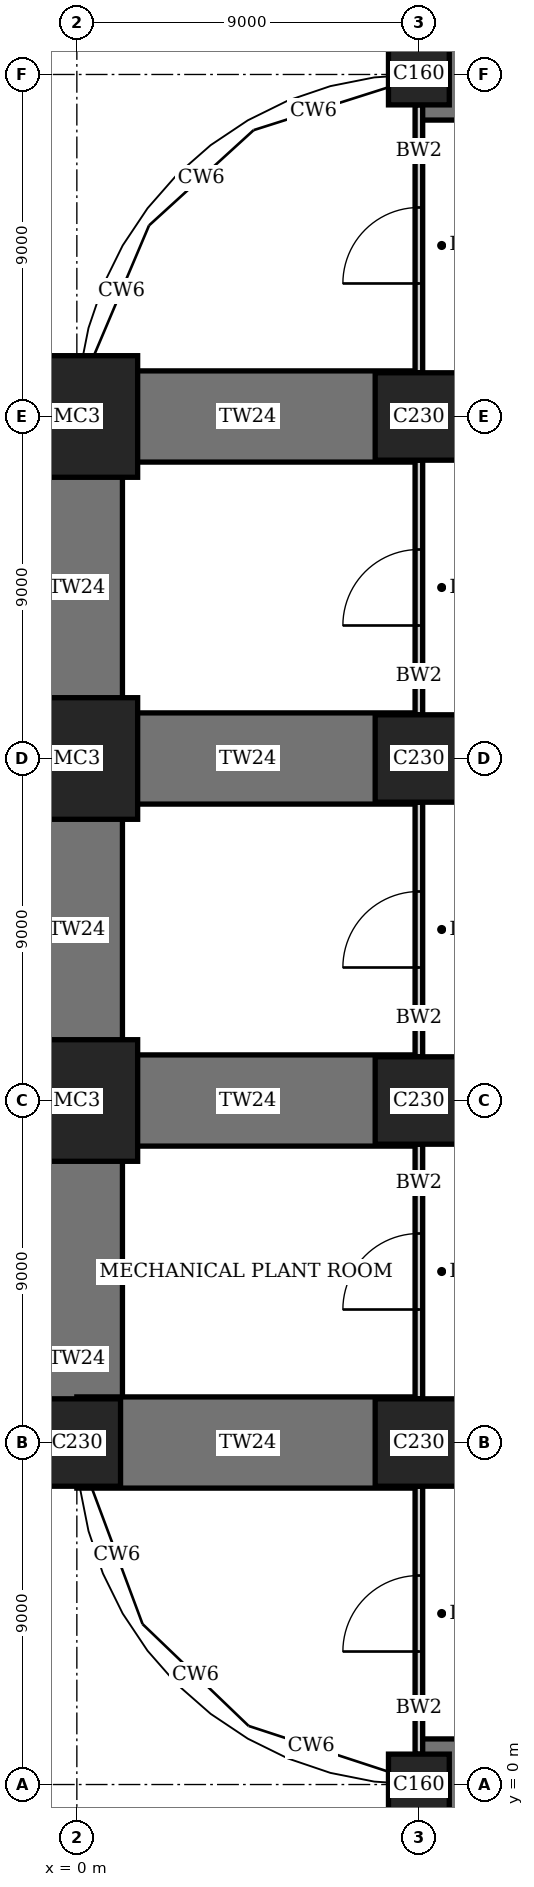
"""IFC4 building model, lengths in metres.
Left out: names, types, materials, properties, quantities, classifications, styles, units other than length and angle.
Written with IfcOpenShell. Run it as: python <this file> out.ifc"""

import sys

from ifc_helpers import new_model, si_unit, direction, frame, frame_2d, origin, origin_2d, place, context, subcontext, project, spatial, rectangle, extrude, element, fill, save


model = new_model("IFC4")
c1 = context("Model", 3, precision=1e-05, world=origin(), true_north=direction((0.0, 1.0)))
c2 = subcontext(c1, "Body", "Model", "MODEL_VIEW")
j1 = project(units=[si_unit("LENGTHUNIT", "METRE"), si_unit("PLANEANGLEUNIT", "RADIAN")], contexts=[c1])
p1 = place(None, origin())
s1 = spatial("IfcSite", under=j1, at=p1, CompositionType="ELEMENT")
p2 = place(p1, origin())
s2 = spatial("IfcBuilding", under=s1, at=p2, CompositionType="ELEMENT")
p3 = place(p2, frame((0.0, 0.0, 234.4)))
s3 = spatial("IfcBuildingStorey", under=s2, at=p3, CompositionType="ELEMENT", Elevation=234.4)
p4 = place(p3, frame((0.0, 9.0, 0.0), z_axis=(0.0, 0.0, 1.0), x_axis=(1.0, 0.0, 0.0)))
e1 = element("IfcColumn", 1, at=p4, inside=s3, PredefinedType="COLUMN", context=c2, shape_type="SweptSolid", body=[
    extrude(rectangle(XDim=2.3, YDim=2.3, at=origin_2d()), origin(), (0.0, 0.0, 1.0), 5.0),
])
for number, where, z_axis, x_axis in (
    (2, (0.0, 18.0, 0.0), (0.0, 0.0, 1.0), (1.0, 0.0, 0.0)),
    (3, (0.0, 27.0, 0.0), (0.0, 0.0, 1.0), (1.0, 0.0, 0.0)),
    (4, (0.0, 36.0, 0.0), (0.0, 0.0, 1.0), (1.0, 0.0, 0.0)),
):
    element("IfcColumn", number, at=place(p3, frame(where, z_axis=z_axis, x_axis=x_axis)), inside=s3, PredefinedType="COLUMN", context=c2, shape_type="SweptSolid", body=[
        extrude(rectangle(XDim=3.2, YDim=3.2, at=origin_2d()), origin(), (0.0, 0.0, 1.0), 5.0),
    ])
p5 = place(p3, frame((9.0, 0.0, 0.0), z_axis=(0.0, 0.0, 1.0), x_axis=(1.0, 0.0, 0.0)))
e5 = element("IfcColumn", 5, at=p5, inside=s3, PredefinedType="COLUMN", context=c2, shape_type="SweptSolid", body=[
    extrude(rectangle(XDim=1.6, YDim=1.6, at=origin_2d()), origin(), (0.0, 0.0, 1.0), 5.0),
])
for number, where, z_axis, x_axis in (
    (6, (9.0, 9.0, 0.0), (0.0, 0.0, 1.0), (1.0, 0.0, 0.0)),
    (7, (9.0, 18.0, 0.0), (0.0, 0.0, 1.0), (1.0, 0.0, 0.0)),
    (8, (9.0, 27.0, 0.0), (0.0, 0.0, 1.0), (1.0, 0.0, 0.0)),
    (9, (9.0, 36.0, 0.0), (0.0, 0.0, 1.0), (1.0, 0.0, 0.0)),
):
    element("IfcColumn", number, at=place(p3, frame(where, z_axis=z_axis, x_axis=x_axis)), inside=s3, PredefinedType="COLUMN", context=c2, shape_type="SweptSolid", body=[
        extrude(rectangle(XDim=2.3, YDim=2.3, at=origin_2d()), origin(), (0.0, 0.0, 1.0), 5.0),
    ])
p6 = place(p3, frame((9.0, 45.0, 0.0), z_axis=(0.0, 0.0, 1.0), x_axis=(1.0, 0.0, 0.0)))
e10 = element("IfcColumn", 10, at=p6, inside=s3, PredefinedType="COLUMN", context=c2, shape_type="SweptSolid", body=[
    extrude(rectangle(XDim=1.6, YDim=1.6, at=origin_2d()), origin(), (0.0, 0.0, 1.0), 5.0),
])
for number, where, z_axis, x_axis in (
    (11, (9.0, 0.0, 0.0), (0.0, 0.0, 1.0), (1.0, 0.0, 0.0)),
    (12, (9.0, 45.0, 0.0), (0.0, 0.0, 1.0), (1.0, 0.0, 0.0)),
    (13, (0.0, 9.0, 0.0), (0.0, 0.0, 1.0), (0.0, 1.0, 0.0)),
    (14, (0.0, 18.0, 0.0), (0.0, 0.0, 1.0), (0.0, 1.0, 0.0)),
    (15, (0.0, 27.0, 0.0), (0.0, 0.0, 1.0), (0.0, 1.0, 0.0)),
    (16, (9.0, 9.0, 0.0), (0.0, 0.0, 1.0), (-1.0, 0.0, 0.0)),
    (17, (9.0, 18.0, 0.0), (0.0, 0.0, 1.0), (-1.0, 0.0, 0.0)),
    (18, (9.0, 27.0, 0.0), (0.0, 0.0, 1.0), (-1.0, 0.0, 0.0)),
    (19, (9.0, 36.0, 0.0), (0.0, 0.0, 1.0), (-1.0, 0.0, 0.0)),
):
    element("IfcWall", number, at=place(p3, frame(where, z_axis=z_axis, x_axis=x_axis)), inside=s3, PredefinedType="SHEAR", context=c2, shape_type="SweptSolid", body=[
        extrude(rectangle(XDim=9.0, YDim=2.4, at=frame_2d((4.5, 0.0))), origin(), (0.0, 0.0, 1.0), 5.0),
    ])
p7 = place(p3, frame((9.0, 0.8, 0.0), z_axis=(0.0, 0.0, 1.0), x_axis=(0.0, 1.0, 0.0)))
e20 = element("IfcWall", 20, at=p7, inside=s3, PredefinedType="SOLIDWALL", context=c2, shape_type="SweptSolid", body=[
    extrude(rectangle(XDim=7.05, YDim=0.2, at=frame_2d((3.525, 0.0))), origin(), (0.0, 0.0, 1.0), 3.8),
])
p8 = place(p7, frame((2.7, 0.0, 0.0)))
e21 = element("IfcOpeningElement", 21, at=p8, cuts=e20, PredefinedType="OPENING", context=c2, shape_type="SweptSolid", body=[
    extrude(rectangle(XDim=2.0, YDim=2.7, at=frame_2d((1.0, 1.35))), frame((0.0, 0.11, 0.0), z_axis=(0.0, -1.0, 0.0), x_axis=(1.0, 0.0, 0.0)), (0.0, 0.0, 1.0), 0.22),
])
p9 = place(p3, frame((9.0, 10.15, 0.0), z_axis=(0.0, 0.0, 1.0), x_axis=(0.0, 1.0, 0.0)))
e22 = element("IfcWall", 22, at=p9, inside=s3, PredefinedType="SOLIDWALL", context=c2, shape_type="SweptSolid", body=[
    extrude(rectangle(XDim=6.7, YDim=0.2, at=frame_2d((3.35, 0.0))), origin(), (0.0, 0.0, 1.0), 3.8),
])
p10 = place(p9, frame((2.35, 0.0, 0.0)))
e23 = element("IfcOpeningElement", 23, at=p10, cuts=e22, PredefinedType="OPENING", context=c2, shape_type="SweptSolid", body=[
    extrude(rectangle(XDim=2.0, YDim=2.7, at=frame_2d((1.0, 1.35))), frame((0.0, 0.11, 0.0), z_axis=(0.0, -1.0, 0.0), x_axis=(1.0, 0.0, 0.0)), (0.0, 0.0, 1.0), 0.22),
])
p11 = place(p3, frame((9.0, 19.15, 0.0), z_axis=(0.0, 0.0, 1.0), x_axis=(0.0, 1.0, 0.0)))
e24 = element("IfcWall", 24, at=p11, inside=s3, PredefinedType="SOLIDWALL", context=c2, shape_type="SweptSolid", body=[
    extrude(rectangle(XDim=6.7, YDim=0.2, at=frame_2d((3.35, 0.0))), origin(), (0.0, 0.0, 1.0), 3.8),
])
p12 = place(p11, frame((2.35, 0.0, 0.0)))
e25 = element("IfcOpeningElement", 25, at=p12, cuts=e24, PredefinedType="OPENING", context=c2, shape_type="SweptSolid", body=[
    extrude(rectangle(XDim=2.0, YDim=2.7, at=frame_2d((1.0, 1.35))), frame((0.0, 0.11, 0.0), z_axis=(0.0, -1.0, 0.0), x_axis=(1.0, 0.0, 0.0)), (0.0, 0.0, 1.0), 0.22),
])
p13 = place(p3, frame((9.0, 28.15, 0.0), z_axis=(0.0, 0.0, 1.0), x_axis=(0.0, 1.0, 0.0)))
e26 = element("IfcWall", 26, at=p13, inside=s3, PredefinedType="SOLIDWALL", context=c2, shape_type="SweptSolid", body=[
    extrude(rectangle(XDim=6.7, YDim=0.2, at=frame_2d((3.35, 0.0))), origin(), (0.0, 0.0, 1.0), 3.8),
])
p14 = place(p13, frame((2.35, 0.0, 0.0)))
e27 = element("IfcOpeningElement", 27, at=p14, cuts=e26, PredefinedType="OPENING", context=c2, shape_type="SweptSolid", body=[
    extrude(rectangle(XDim=2.0, YDim=2.7, at=frame_2d((1.0, 1.35))), frame((0.0, 0.11, 0.0), z_axis=(0.0, -1.0, 0.0), x_axis=(1.0, 0.0, 0.0)), (0.0, 0.0, 1.0), 0.22),
])
p15 = place(p3, frame((9.0, 37.15, 0.0), z_axis=(0.0, 0.0, 1.0), x_axis=(0.0, 1.0, 0.0)))
e28 = element("IfcWall", 28, at=p15, inside=s3, PredefinedType="SOLIDWALL", context=c2, shape_type="SweptSolid", body=[
    extrude(rectangle(XDim=7.05, YDim=0.2, at=frame_2d((3.525, 0.0))), origin(), (0.0, 0.0, 1.0), 3.8),
])
p16 = place(p15, frame((2.35, 0.0, 0.0)))
e29 = element("IfcOpeningElement", 29, at=p16, cuts=e28, PredefinedType="OPENING", context=c2, shape_type="SweptSolid", body=[
    extrude(rectangle(XDim=2.0, YDim=2.7, at=frame_2d((1.0, 1.35))), frame((0.0, 0.11, 0.0), z_axis=(0.0, -1.0, 0.0), x_axis=(1.0, 0.0, 0.0)), (0.0, 0.0, 1.0), 0.22),
])
p17 = place(p8, origin())
e30 = element("IfcDoor", 30, at=p17, inside=s3, OperationType="DOUBLE_DOOR_SINGLE_SWING", PredefinedType="DOOR", context=c2, shape_type="SweptSolid", body=[
    extrude(rectangle(XDim=2.0, YDim=2.7, at=frame_2d((1.0, 1.35))), frame((0.0, 0.03, 0.0), z_axis=(0.0, -1.0, 0.0), x_axis=(1.0, 0.0, 0.0)), (0.0, 0.0, 1.0), 0.06),
])
fill(e21, e30)
p18 = place(p10, origin())
e31 = element("IfcDoor", 31, at=p18, inside=s3, OperationType="DOUBLE_DOOR_SINGLE_SWING", PredefinedType="DOOR", context=c2, shape_type="SweptSolid", body=[
    extrude(rectangle(XDim=2.0, YDim=2.7, at=frame_2d((1.0, 1.35))), frame((0.0, 0.03, 0.0), z_axis=(0.0, -1.0, 0.0), x_axis=(1.0, 0.0, 0.0)), (0.0, 0.0, 1.0), 0.06),
])
fill(e23, e31)
p19 = place(p12, origin())
e32 = element("IfcDoor", 32, at=p19, inside=s3, OperationType="DOUBLE_DOOR_SINGLE_SWING", PredefinedType="DOOR", context=c2, shape_type="SweptSolid", body=[
    extrude(rectangle(XDim=2.0, YDim=2.7, at=frame_2d((1.0, 1.35))), frame((0.0, 0.03, 0.0), z_axis=(0.0, -1.0, 0.0), x_axis=(1.0, 0.0, 0.0)), (0.0, 0.0, 1.0), 0.06),
])
fill(e25, e32)
p20 = place(p14, origin())
e33 = element("IfcDoor", 33, at=p20, inside=s3, OperationType="DOUBLE_DOOR_SINGLE_SWING", PredefinedType="DOOR", context=c2, shape_type="SweptSolid", body=[
    extrude(rectangle(XDim=2.0, YDim=2.7, at=frame_2d((1.0, 1.35))), frame((0.0, 0.03, 0.0), z_axis=(0.0, -1.0, 0.0), x_axis=(1.0, 0.0, 0.0)), (0.0, 0.0, 1.0), 0.06),
])
fill(e27, e33)
p21 = place(p16, origin())
e34 = element("IfcDoor", 34, at=p21, inside=s3, OperationType="DOUBLE_DOOR_SINGLE_SWING", PredefinedType="DOOR", context=c2, shape_type="SweptSolid", body=[
    extrude(rectangle(XDim=2.0, YDim=2.7, at=frame_2d((1.0, 1.35))), frame((0.0, 0.03, 0.0), z_axis=(0.0, -1.0, 0.0), x_axis=(1.0, 0.0, 0.0)), (0.0, 0.0, 1.0), 0.06),
])
fill(e29, e34)
save(model, sys.argv[1])
